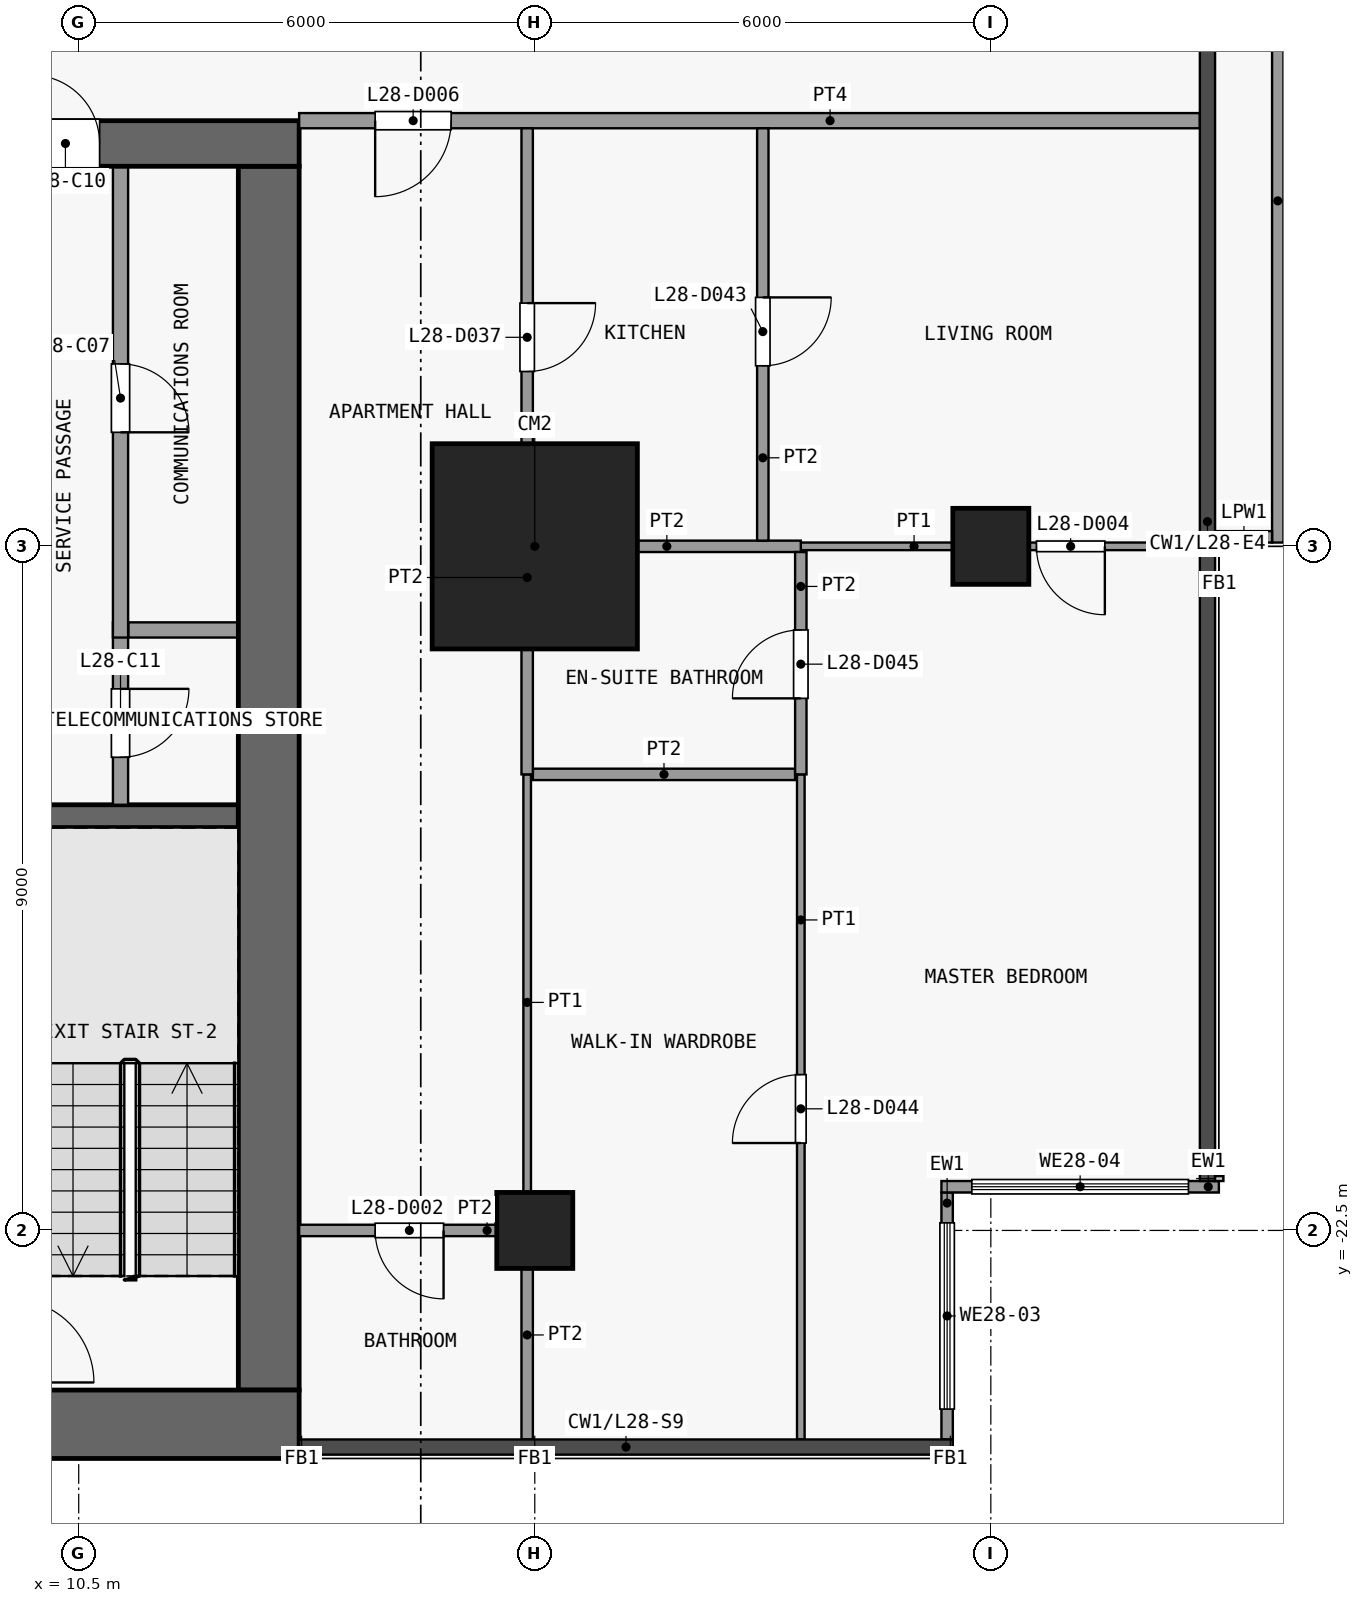
"""IFC4 building model, lengths in metres.
Left out: names, types, materials, properties, quantities, classifications, styles, units other than length and angle.
Written with IfcOpenShell. Run it as: python <this file> out.ifc"""

import sys

from ifc_helpers import new_model, si_unit, direction, frame, frame_2d, origin, origin_2d, place, context, subcontext, project, spatial, rectangle, extrude, element, fill, save


model = new_model("IFC4")
c1 = context("Model", 3, precision=1e-05, world=origin(), true_north=direction((0.0, 1.0)))
c2 = subcontext(c1, "Body", "Model", "MODEL_VIEW")
j1 = project(units=[si_unit("LENGTHUNIT", "METRE"), si_unit("PLANEANGLEUNIT", "RADIAN")], contexts=[c1])
p1 = place(None, origin())
s1 = spatial("IfcSite", under=j1, at=p1, CompositionType="ELEMENT")
p2 = place(p1, origin())
s2 = spatial("IfcBuilding", under=s1, at=p2, CompositionType="ELEMENT")
p3 = place(p2, frame((0.0, 0.0, 113.5)))
s3 = spatial("IfcBuildingStorey", under=s2, at=p3, CompositionType="ELEMENT", Elevation=113.5)
p4 = place(p3, frame((16.5, -22.5, 0.0), z_axis=(0.0, 0.0, 1.0), x_axis=(1.0, 0.0, 0.0)))
e1 = element("IfcColumn", 1, at=p4, inside=s3, PredefinedType="COLUMN", context=c2, shape_type="SweptSolid", body=[
    extrude(rectangle(XDim=1.0, YDim=1.0, at=origin_2d()), origin(), (0.0, 0.0, 1.0), 3.6),
])
p5 = place(p3, frame((16.5, -13.5, 0.0), z_axis=(0.0, 0.0, 1.0), x_axis=(1.0, 0.0, 0.0)))
e2 = element("IfcColumn", 2, at=p5, inside=s3, PredefinedType="COLUMN", context=c2, shape_type="SweptSolid", body=[
    extrude(rectangle(XDim=2.7, YDim=2.7, at=origin_2d()), origin(), (0.0, 0.0, 1.0), 3.6),
])
p6 = place(p3, frame((22.5, -13.5, 0.0), z_axis=(0.0, 0.0, 1.0), x_axis=(1.0, 0.0, 0.0)))
e3 = element("IfcColumn", 3, at=p6, inside=s3, PredefinedType="COLUMN", context=c2, shape_type="SweptSolid", body=[
    extrude(rectangle(XDim=1.0, YDim=1.0, at=origin_2d()), origin(), (0.0, 0.0, 1.0), 3.6),
])
p7 = place(p3, frame((-13.4, -25.05, 0.0), z_axis=(0.0, 0.0, 1.0), x_axis=(1.0, 0.0, 0.0)))
e4 = element("IfcWall", 4, at=p7, inside=s3, PredefinedType="SHEAR", context=c2, shape_type="SweptSolid", body=[
    extrude(rectangle(XDim=26.8, YDim=0.9, at=frame_2d((13.4, 0.0))), origin(), (0.0, 0.0, 1.0), 3.3),
])
p8 = place(p3, frame((-13.4, -8.2, 0.0), z_axis=(0.0, 0.0, 1.0), x_axis=(1.0, 0.0, 0.0)))
e5 = element("IfcWall", 5, at=p8, inside=s3, PredefinedType="SHEAR", context=c2, shape_type="SweptSolid", body=[
    extrude(rectangle(XDim=26.8, YDim=0.6, at=frame_2d((13.4, 0.0))), origin(), (0.0, 0.0, 1.0), 3.3),
])
p9 = place(p8, frame((7.7, 0.0, 0.0)))
e6 = element("IfcOpeningElement", 6, at=p9, cuts=e5, PredefinedType="OPENING", context=c2, shape_type="SweptSolid", body=[
    extrude(rectangle(XDim=1.8, YDim=2.1, at=frame_2d((0.9, 1.05))), frame((0.0, 0.31, 0.0), z_axis=(0.0, -1.0, 0.0), x_axis=(1.0, 0.0, 0.0)), (0.0, 0.0, 1.0), 0.62),
])
p10 = place(p8, frame((17.3, 0.0, 0.0)))
e7 = element("IfcOpeningElement", 7, at=p10, cuts=e5, PredefinedType="OPENING", context=c2, shape_type="SweptSolid", body=[
    extrude(rectangle(XDim=1.8, YDim=2.1, at=frame_2d((0.9, 1.05))), frame((0.0, 0.31, 0.0), z_axis=(0.0, -1.0, 0.0), x_axis=(1.0, 0.0, 0.0)), (0.0, 0.0, 1.0), 0.62),
])
p11 = place(p8, frame((1.625, 0.0, 0.0)))
e8 = element("IfcOpeningElement", 8, at=p11, cuts=e5, PredefinedType="OPENING", context=c2, shape_type="SweptSolid", body=[
    extrude(rectangle(XDim=1.2, YDim=2.1, at=frame_2d((0.6, 1.05))), frame((0.0, 0.31, 0.0), z_axis=(0.0, -1.0, 0.0), x_axis=(1.0, 0.0, 0.0)), (0.0, 0.0, 1.0), 0.62),
])
p12 = place(p8, frame((23.275, 0.0, 0.0)))
e9 = element("IfcOpeningElement", 9, at=p12, cuts=e5, PredefinedType="OPENING", context=c2, shape_type="SweptSolid", body=[
    extrude(rectangle(XDim=0.9, YDim=2.1, at=frame_2d((0.45, 1.05))), frame((0.0, 0.31, 0.0), z_axis=(0.0, -1.0, 0.0), x_axis=(1.0, 0.0, 0.0)), (0.0, 0.0, 1.0), 0.62),
])
p13 = place(p3, frame((13.0, -24.6, 0.0), z_axis=(0.0, 0.0, 1.0), x_axis=(0.0, 1.0, 0.0)))
e10 = element("IfcWall", 10, at=p13, inside=s3, PredefinedType="SHEAR", context=c2, shape_type="SweptSolid", body=[
    extrude(rectangle(XDim=16.1, YDim=0.8, at=frame_2d((8.05, 0.0))), origin(), (0.0, 0.0, 1.0), 3.3),
])
p14 = place(p3, frame((9.5, -17.05, 0.0), z_axis=(0.0, 0.0, 1.0), x_axis=(1.0, 0.0, 0.0)))
e11 = element("IfcWall", 11, at=p14, inside=s3, PredefinedType="SHEAR", context=c2, shape_type="SweptSolid", body=[
    extrude(rectangle(XDim=3.1, YDim=0.3, at=frame_2d((1.55, 0.0))), origin(), (0.0, 0.0, 1.0), 3.3),
])
p15 = place(p3, frame((11.15, -14.6, 0.0), z_axis=(0.0, 0.0, 1.0), x_axis=(1.0, 0.0, 0.0)))
e12 = element("IfcWall", 12, at=p15, inside=s3, PredefinedType="PARTITIONING", context=c2, shape_type="SweptSolid", body=[
    extrude(rectangle(XDim=1.45, YDim=0.2, at=frame_2d((0.725, 0.0))), origin(), (0.0, 0.0, 1.0), 3.3),
])
p16 = place(p3, frame((11.05, -14.5, 0.0), z_axis=(0.0, 0.0, 1.0), x_axis=(0.0, -1.0, 0.0)))
e13 = element("IfcWall", 13, at=p16, inside=s3, PredefinedType="PARTITIONING", context=c2, shape_type="SweptSolid", body=[
    extrude(rectangle(XDim=2.4, YDim=0.2, at=frame_2d((1.2, 0.0))), origin(), (0.0, 0.0, 1.0), 3.3),
])
p17 = place(p16, frame((0.875, 0.0, 0.0)))
e14 = element("IfcOpeningElement", 14, at=p17, cuts=e13, PredefinedType="OPENING", context=c2, shape_type="SweptSolid", body=[
    extrude(rectangle(XDim=0.9, YDim=2.1, at=frame_2d((0.45, 1.05))), frame((0.0, 0.11, 0.0), z_axis=(0.0, -1.0, 0.0), x_axis=(1.0, 0.0, 0.0)), (0.0, 0.0, 1.0), 0.22),
])
p18 = place(p3, frame((11.05, -8.5, 0.0), z_axis=(0.0, 0.0, 1.0), x_axis=(0.0, -1.0, 0.0)))
e15 = element("IfcWall", 15, at=p18, inside=s3, PredefinedType="PARTITIONING", context=c2, shape_type="SweptSolid", body=[
    extrude(rectangle(XDim=6.2, YDim=0.2, at=frame_2d((3.1, 0.0))), origin(), (0.0, 0.0, 1.0), 3.3),
])
p19 = place(p18, frame((2.6, 0.0, 0.0)))
e16 = element("IfcOpeningElement", 16, at=p19, cuts=e15, PredefinedType="OPENING", context=c2, shape_type="SweptSolid", body=[
    extrude(rectangle(XDim=0.9, YDim=2.1, at=frame_2d((0.45, 1.05))), frame((0.0, 0.11, 0.0), z_axis=(0.0, -1.0, 0.0), x_axis=(1.0, 0.0, 0.0)), (0.0, 0.0, 1.0), 0.22),
])
p20 = place(p3, frame((21.925, -22.0, 0.0), z_axis=(0.0, 0.0, 1.0), x_axis=(0.0, -1.0, 0.0)))
e17 = element("IfcWall", 17, at=p20, inside=s3, PredefinedType="SOLIDWALL", context=c2, shape_type="SweptSolid", body=[
    extrude(rectangle(XDim=3.25, YDim=0.15, at=frame_2d((1.625, 0.0))), origin(), (0.0, 0.0, 1.0), 3.3),
])
p21 = place(p20, frame((0.4, 0.0, 0.9)))
e18 = element("IfcOpeningElement", 18, at=p21, cuts=e17, PredefinedType="OPENING", context=c2, shape_type="SweptSolid", body=[
    extrude(rectangle(XDim=2.45, YDim=2.4, at=frame_2d((1.225, 1.2))), frame((0.0, 0.085, 0.0), z_axis=(0.0, -1.0, 0.0), x_axis=(1.0, 0.0, 0.0)), (0.0, 0.0, 1.0), 0.17),
])
p22 = place(p3, frame((25.5, -21.925, 0.0), z_axis=(0.0, 0.0, 1.0), x_axis=(-1.0, 0.0, 0.0)))
e19 = element("IfcWall", 19, at=p22, inside=s3, PredefinedType="SOLIDWALL", context=c2, shape_type="SweptSolid", body=[
    extrude(rectangle(XDim=3.65, YDim=0.15, at=frame_2d((1.825, 0.0))), origin(), (0.0, 0.0, 1.0), 3.3),
])
p23 = place(p22, frame((0.4, 0.0, 0.9)))
e20 = element("IfcOpeningElement", 20, at=p23, cuts=e19, PredefinedType="OPENING", context=c2, shape_type="SweptSolid", body=[
    extrude(rectangle(XDim=2.85, YDim=2.4, at=frame_2d((1.425, 1.2))), frame((0.0, 0.085, 0.0), z_axis=(0.0, -1.0, 0.0), x_axis=(1.0, 0.0, 0.0)), (0.0, 0.0, 1.0), 0.17),
])
p24 = place(p3, frame((26.275, -4.46, 0.0), z_axis=(0.0, 0.0, 1.0), x_axis=(0.0, -1.0, 0.0)))
e21 = element("IfcWall", 21, at=p24, inside=s3, PredefinedType="PARAPET", context=c2, shape_type="SweptSolid", body=[
    extrude(rectangle(XDim=8.99, YDim=0.15, at=frame_2d((4.495, 0.0))), origin(), (0.0, 0.0, 1.0), 1.15),
])
p25 = place(p3, frame((26.2, -13.375, 0.0), z_axis=(0.0, 0.0, 1.0), x_axis=(-1.0, 0.0, 0.0)))
e22 = element("IfcWall", 22, at=p25, inside=s3, PredefinedType="PARAPET", context=c2, shape_type="SweptSolid", body=[
    extrude(rectangle(XDim=0.74, YDim=0.15, at=frame_2d((0.37, 0.0))), origin(), (0.0, 0.0, 1.0), 1.15),
])
p26 = place(p3, frame((13.4, -22.5, 0.0), z_axis=(0.0, 0.0, 1.0), x_axis=(1.0, 0.0, 0.0)))
e23 = element("IfcWall", 23, at=p26, inside=s3, PredefinedType="PARTITIONING", context=c2, shape_type="SweptSolid", body=[
    extrude(rectangle(XDim=2.925, YDim=0.15, at=frame_2d((1.462, 0.0))), origin(), (0.0, 0.0, 1.0), 3.3),
])
p27 = place(p26, frame((1.0, 0.0, 0.0)))
e24 = element("IfcOpeningElement", 24, at=p27, cuts=e23, PredefinedType="OPENING", context=c2, shape_type="SweptSolid", body=[
    extrude(rectangle(XDim=0.9, YDim=2.1, at=frame_2d((0.45, 1.05))), frame((0.0, 0.085, 0.0), z_axis=(0.0, -1.0, 0.0), x_axis=(1.0, 0.0, 0.0)), (0.0, 0.0, 1.0), 0.17),
])
p28 = place(p3, frame((16.475, -16.5, 0.0), z_axis=(0.0, 0.0, 1.0), x_axis=(1.0, 0.0, 0.0)))
e25 = element("IfcWall", 25, at=p28, inside=s3, PredefinedType="PARTITIONING", context=c2, shape_type="SweptSolid", body=[
    extrude(rectangle(XDim=3.45, YDim=0.15, at=frame_2d((1.725, 0.0))), origin(), (0.0, 0.0, 1.0), 3.3),
])
p29 = place(p3, frame((20.0, -13.5, 0.0), z_axis=(0.0, 0.0, 1.0), x_axis=(1.0, 0.0, 0.0)))
e26 = element("IfcWall", 26, at=p29, inside=s3, PredefinedType="PARTITIONING", context=c2, shape_type="SweptSolid", body=[
    extrude(rectangle(XDim=5.25, YDim=0.1, at=frame_2d((2.625, 0.0))), origin(), (0.0, 0.0, 1.0), 3.3),
])
p30 = place(p29, frame((3.1, 0.0, 0.0)))
e27 = element("IfcOpeningElement", 27, at=p30, cuts=e26, PredefinedType="OPENING", context=c2, shape_type="SweptSolid", body=[
    extrude(rectangle(XDim=0.9, YDim=2.1, at=frame_2d((0.45, 1.05))), frame((0.0, 0.06, 0.0), z_axis=(0.0, -1.0, 0.0), x_axis=(1.0, 0.0, 0.0)), (0.0, 0.0, 1.0), 0.12),
])
p31 = place(p3, frame((16.475, -13.5, 0.0), z_axis=(0.0, 0.0, 1.0), x_axis=(1.0, 0.0, 0.0)))
e28 = element("IfcWall", 28, at=p31, inside=s3, PredefinedType="PARTITIONING", context=c2, shape_type="SweptSolid", body=[
    extrude(rectangle(XDim=3.525, YDim=0.15, at=frame_2d((1.762, 0.0))), origin(), (0.0, 0.0, 1.0), 3.3),
])
p32 = place(p3, frame((13.4, -7.9, 0.0), z_axis=(0.0, 0.0, 1.0), x_axis=(1.0, 0.0, 0.0)))
e29 = element("IfcWall", 29, at=p32, inside=s3, PredefinedType="PARTITIONING", context=c2, shape_type="SweptSolid", body=[
    extrude(rectangle(XDim=11.85, YDim=0.2, at=frame_2d((5.925, 0.0))), origin(), (0.0, 0.0, 1.0), 3.3),
])
p33 = place(p32, frame((1.0, 0.0, 0.0)))
e30 = element("IfcOpeningElement", 30, at=p33, cuts=e29, PredefinedType="OPENING", context=c2, shape_type="SweptSolid", body=[
    extrude(rectangle(XDim=1.0, YDim=2.1, at=frame_2d((0.5, 1.05))), frame((0.0, 0.11, 0.0), z_axis=(0.0, -1.0, 0.0), x_axis=(1.0, 0.0, 0.0)), (0.0, 0.0, 1.0), 0.22),
])
p34 = place(p3, frame((16.4, -22.5, 0.0), z_axis=(0.0, 0.0, 1.0), x_axis=(0.0, 1.0, 0.0)))
e31 = element("IfcWall", 31, at=p34, inside=s3, PredefinedType="PARTITIONING", context=c2, shape_type="SweptSolid", body=[
    extrude(rectangle(XDim=6.0, YDim=0.1, at=frame_2d((3.0, 0.0))), origin(), (0.0, 0.0, 1.0), 3.3),
])
p35 = place(p3, frame((16.4, -25.25, 0.0), z_axis=(0.0, 0.0, 1.0), x_axis=(0.0, 1.0, 0.0)))
e32 = element("IfcWall", 32, at=p35, inside=s3, PredefinedType="PARTITIONING", context=c2, shape_type="SweptSolid", body=[
    extrude(rectangle(XDim=2.75, YDim=0.15, at=frame_2d((1.375, 0.0))), origin(), (0.0, 0.0, 1.0), 3.3),
])
p36 = place(p3, frame((16.4, -16.5, 0.0), z_axis=(0.0, 0.0, 1.0), x_axis=(0.0, 1.0, 0.0)))
e33 = element("IfcWall", 33, at=p36, inside=s3, PredefinedType="PARTITIONING", context=c2, shape_type="SweptSolid", body=[
    extrude(rectangle(XDim=8.5, YDim=0.15, at=frame_2d((4.25, 0.0))), origin(), (0.0, 0.0, 1.0), 3.3),
])
p37 = place(p36, frame((5.3, 0.0, 0.0)))
e34 = element("IfcOpeningElement", 34, at=p37, cuts=e33, PredefinedType="OPENING", context=c2, shape_type="SweptSolid", body=[
    extrude(rectangle(XDim=0.9, YDim=2.1, at=frame_2d((0.45, 1.05))), frame((0.0, 0.085, 0.0), z_axis=(0.0, -1.0, 0.0), x_axis=(1.0, 0.0, 0.0)), (0.0, 0.0, 1.0), 0.17),
])
p38 = place(p3, frame((19.5, -13.425, 0.0), z_axis=(0.0, 0.0, 1.0), x_axis=(0.0, 1.0, 0.0)))
e35 = element("IfcWall", 35, at=p38, inside=s3, PredefinedType="PARTITIONING", context=c2, shape_type="SweptSolid", body=[
    extrude(rectangle(XDim=5.425, YDim=0.15, at=frame_2d((2.712, 0.0))), origin(), (0.0, 0.0, 1.0), 3.3),
])
p39 = place(p38, frame((2.3, 0.0, 0.0)))
e36 = element("IfcOpeningElement", 36, at=p39, cuts=e35, PredefinedType="OPENING", context=c2, shape_type="SweptSolid", body=[
    extrude(rectangle(XDim=0.9, YDim=2.1, at=frame_2d((0.45, 1.05))), frame((0.0, 0.085, 0.0), z_axis=(0.0, -1.0, 0.0), x_axis=(1.0, 0.0, 0.0)), (0.0, 0.0, 1.0), 0.17),
])
p40 = place(p3, frame((20.0, -25.25, 0.0), z_axis=(0.0, 0.0, 1.0), x_axis=(0.0, 1.0, 0.0)))
e37 = element("IfcWall", 37, at=p40, inside=s3, PredefinedType="PARTITIONING", context=c2, shape_type="SweptSolid", body=[
    extrude(rectangle(XDim=8.75, YDim=0.1, at=frame_2d((4.375, 0.0))), origin(), (0.0, 0.0, 1.0), 3.3),
])
p41 = place(p40, frame((3.9, 0.0, 0.0)))
e38 = element("IfcOpeningElement", 38, at=p41, cuts=e37, PredefinedType="OPENING", context=c2, shape_type="SweptSolid", body=[
    extrude(rectangle(XDim=0.9, YDim=2.1, at=frame_2d((0.45, 1.05))), frame((0.0, 0.06, 0.0), z_axis=(0.0, -1.0, 0.0), x_axis=(1.0, 0.0, 0.0)), (0.0, 0.0, 1.0), 0.12),
])
p42 = place(p3, frame((20.0, -16.5, 0.0), z_axis=(0.0, 0.0, 1.0), x_axis=(0.0, 1.0, 0.0)))
e39 = element("IfcWall", 39, at=p42, inside=s3, PredefinedType="PARTITIONING", context=c2, shape_type="SweptSolid", body=[
    extrude(rectangle(XDim=2.925, YDim=0.15, at=frame_2d((1.462, 0.0))), origin(), (0.0, 0.0, 1.0), 3.3),
])
p43 = place(p42, frame((1.0, 0.0, 0.0)))
e40 = element("IfcOpeningElement", 40, at=p43, cuts=e39, PredefinedType="OPENING", context=c2, shape_type="SweptSolid", body=[
    extrude(rectangle(XDim=0.9, YDim=2.1, at=frame_2d((0.45, 1.05))), frame((0.0, 0.085, 0.0), z_axis=(0.0, -1.0, 0.0), x_axis=(1.0, 0.0, 0.0)), (0.0, 0.0, 1.0), 0.17),
])
p44 = place(p19, origin())
e41 = element("IfcDoor", 41, at=p44, inside=s3, OperationType="SINGLE_SWING_RIGHT", PredefinedType="DOOR", context=c2, shape_type="SweptSolid", body=[
    extrude(rectangle(XDim=0.9, YDim=2.1, at=frame_2d((0.45, 1.05))), frame((0.0, 0.025, 0.0), z_axis=(0.0, -1.0, 0.0), x_axis=(1.0, 0.0, 0.0)), (0.0, 0.0, 1.0), 0.05),
])
fill(e16, e41)
p45 = place(p12, origin())
e42 = element("IfcDoor", 42, at=p45, inside=s3, OperationType="SINGLE_SWING_LEFT", PredefinedType="DOOR", context=c2, shape_type="SweptSolid", body=[
    extrude(rectangle(XDim=0.9, YDim=2.1, at=frame_2d((0.45, 1.05))), frame((0.0, 0.025, 0.0), z_axis=(0.0, -1.0, 0.0), x_axis=(1.0, 0.0, 0.0)), (0.0, 0.0, 1.0), 0.05),
])
fill(e9, e42)
p46 = place(p17, origin())
e43 = element("IfcDoor", 43, at=p46, inside=s3, OperationType="SINGLE_SWING_LEFT", PredefinedType="DOOR", context=c2, shape_type="SweptSolid", body=[
    extrude(rectangle(XDim=0.9, YDim=2.1, at=frame_2d((0.45, 1.05))), frame((0.0, 0.025, 0.0), z_axis=(0.0, -1.0, 0.0), x_axis=(1.0, 0.0, 0.0)), (0.0, 0.0, 1.0), 0.05),
])
fill(e14, e43)
p47 = place(p21, origin())
e44 = element("IfcWindow", 44, at=p47, inside=s3, PartitioningType="SINGLE_PANEL", PredefinedType="WINDOW", context=c2, shape_type="SweptSolid", body=[
    extrude(rectangle(XDim=2.45, YDim=2.4, at=frame_2d((1.225, 1.2))), frame((0.0, 0.03, 0.0), z_axis=(0.0, -1.0, 0.0), x_axis=(1.0, 0.0, 0.0)), (0.0, 0.0, 1.0), 0.06),
])
fill(e18, e44)
p48 = place(p23, origin())
e45 = element("IfcWindow", 45, at=p48, inside=s3, PartitioningType="SINGLE_PANEL", PredefinedType="WINDOW", context=c2, shape_type="SweptSolid", body=[
    extrude(rectangle(XDim=2.85, YDim=2.4, at=frame_2d((1.425, 1.2))), frame((0.0, 0.03, 0.0), z_axis=(0.0, -1.0, 0.0), x_axis=(1.0, 0.0, 0.0)), (0.0, 0.0, 1.0), 0.06),
])
fill(e20, e45)
p49 = place(p27, origin())
e46 = element("IfcDoor", 46, at=p49, inside=s3, OperationType="SINGLE_SWING_RIGHT", PredefinedType="DOOR", context=c2, shape_type="SweptSolid", body=[
    extrude(rectangle(XDim=0.9, YDim=2.1, at=frame_2d((0.45, 1.05))), frame((0.0, 0.025, 0.0), z_axis=(0.0, -1.0, 0.0), x_axis=(1.0, 0.0, 0.0)), (0.0, 0.0, 1.0), 0.05),
])
fill(e24, e46)
p50 = place(p30, origin())
e47 = element("IfcDoor", 47, at=p50, inside=s3, OperationType="SINGLE_SWING_RIGHT", PredefinedType="DOOR", context=c2, shape_type="SweptSolid", body=[
    extrude(rectangle(XDim=0.9, YDim=2.1, at=frame_2d((0.45, 1.05))), frame((0.0, 0.025, 0.0), z_axis=(0.0, -1.0, 0.0), x_axis=(1.0, 0.0, 0.0)), (0.0, 0.0, 1.0), 0.05),
])
fill(e27, e47)
p51 = place(p33, origin())
e48 = element("IfcDoor", 48, at=p51, inside=s3, OperationType="SINGLE_SWING_LEFT", PredefinedType="DOOR", context=c2, shape_type="SweptSolid", body=[
    extrude(rectangle(XDim=1.0, YDim=2.1, at=frame_2d((0.5, 1.05))), frame((0.0, 0.025, 0.0), z_axis=(0.0, -1.0, 0.0), x_axis=(1.0, 0.0, 0.0)), (0.0, 0.0, 1.0), 0.05),
])
fill(e30, e48)
p52 = place(p37, origin())
e49 = element("IfcDoor", 49, at=p52, inside=s3, OperationType="SINGLE_SWING_RIGHT", PredefinedType="DOOR", context=c2, shape_type="SweptSolid", body=[
    extrude(rectangle(XDim=0.9, YDim=2.1, at=frame_2d((0.45, 1.05))), frame((0.0, 0.025, 0.0), z_axis=(0.0, -1.0, 0.0), x_axis=(1.0, 0.0, 0.0)), (0.0, 0.0, 1.0), 0.05),
])
fill(e34, e49)
p53 = place(p39, origin())
e50 = element("IfcDoor", 50, at=p53, inside=s3, OperationType="SINGLE_SWING_RIGHT", PredefinedType="DOOR", context=c2, shape_type="SweptSolid", body=[
    extrude(rectangle(XDim=0.9, YDim=2.1, at=frame_2d((0.45, 1.05))), frame((0.0, 0.025, 0.0), z_axis=(0.0, -1.0, 0.0), x_axis=(1.0, 0.0, 0.0)), (0.0, 0.0, 1.0), 0.05),
])
fill(e36, e50)
p54 = place(p41, origin())
e51 = element("IfcDoor", 51, at=p54, inside=s3, OperationType="SINGLE_SWING_RIGHT", PredefinedType="DOOR", context=c2, shape_type="SweptSolid", body=[
    extrude(rectangle(XDim=0.9, YDim=2.1, at=frame_2d((0.45, 1.05))), frame((0.0, 0.025, 0.0), z_axis=(0.0, -1.0, 0.0), x_axis=(1.0, 0.0, 0.0)), (0.0, 0.0, 1.0), 0.05),
])
fill(e38, e51)
p55 = place(p43, origin())
e52 = element("IfcDoor", 52, at=p55, inside=s3, OperationType="SINGLE_SWING_RIGHT", PredefinedType="DOOR", context=c2, shape_type="SweptSolid", body=[
    extrude(rectangle(XDim=0.9, YDim=2.1, at=frame_2d((0.45, 1.05))), frame((0.0, 0.025, 0.0), z_axis=(0.0, -1.0, 0.0), x_axis=(1.0, 0.0, 0.0)), (0.0, 0.0, 1.0), 0.05),
])
fill(e40, e52)
save(model, sys.argv[1])
